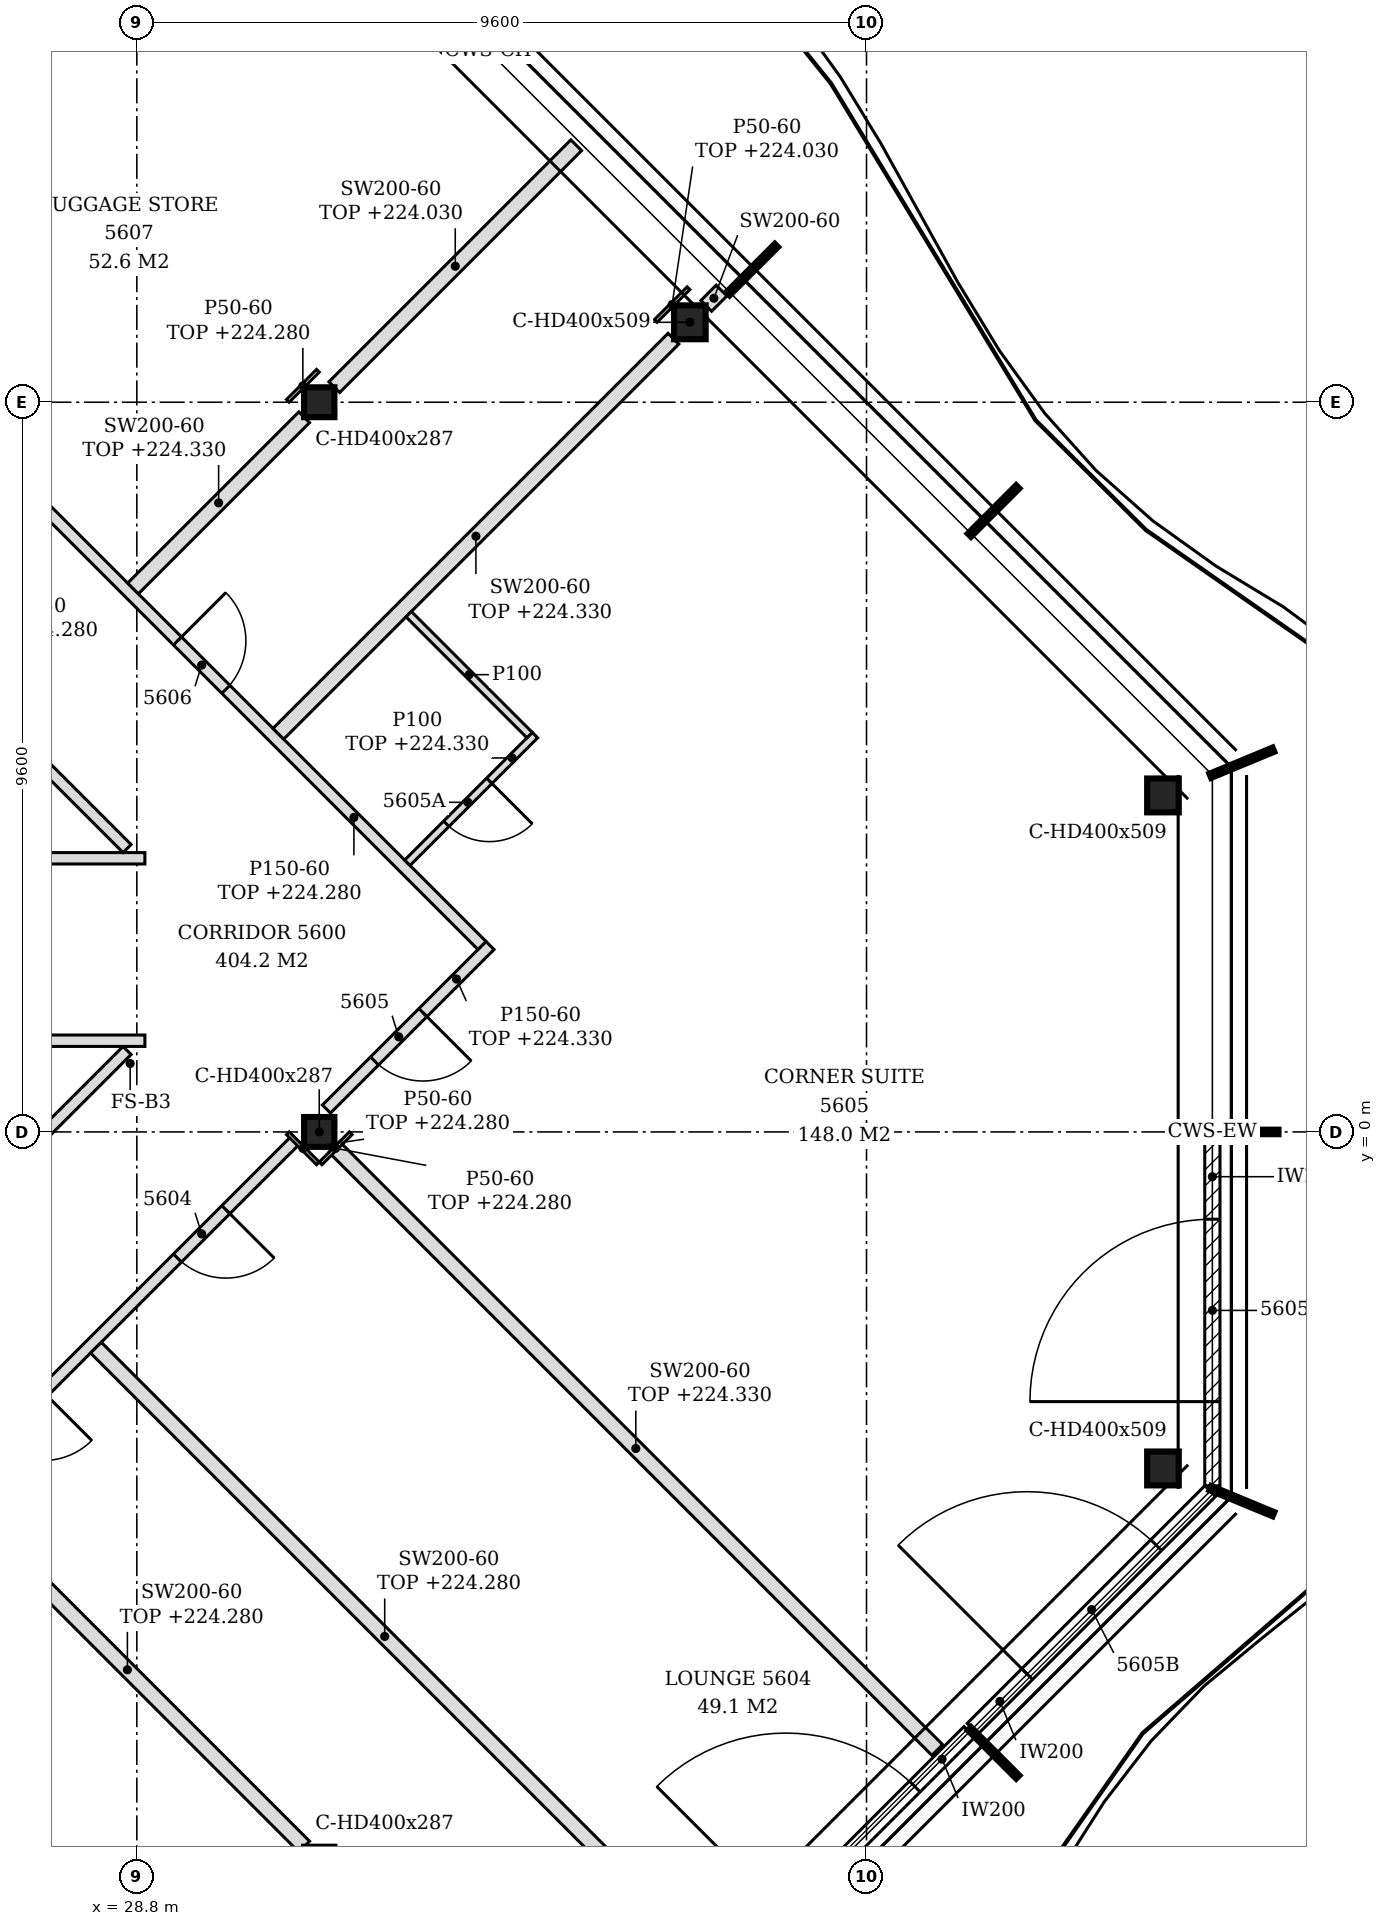
"""IFC4 building model, lengths in metres.
Left out: names, types, materials, properties, quantities, classifications, styles, units other than length and angle.
Written with IfcOpenShell. Run it as: python <this file> out.ifc"""

import sys

from ifc_helpers import new_model, si_unit, direction, frame, frame_2d, origin, origin_2d, place, context, subcontext, project, spatial, polyline, rectangle, i_section, outline, extrude, element, fill, save


model = new_model("IFC4")
c1 = context("Model", 3, precision=1e-05, world=origin(), true_north=direction((0.0, 1.0)))
c2 = subcontext(c1, "Body", "Model", "MODEL_VIEW")
j1 = project(units=[si_unit("LENGTHUNIT", "METRE"), si_unit("PLANEANGLEUNIT", "RADIAN")], contexts=[c1])
p1 = place(None, origin())
s1 = spatial("IfcSite", under=j1, at=p1, CompositionType="ELEMENT")
p2 = place(p1, origin())
s2 = spatial("IfcBuilding", under=s1, at=p2, CompositionType="ELEMENT")
p3 = place(p2, frame((0.0, 0.0, 221.4)))
s3 = spatial("IfcBuildingStorey", under=s2, at=p3, CompositionType="ELEMENT", Elevation=221.4)
for number, where, z_axis, x_axis in (
    (1, (42.3, -4.427, -0.15), (0.0, 0.0, 1.0), (1.0, 0.0, 0.0)),
    (2, (42.3, 4.427, -0.15), (0.0, 0.0, 1.0), (1.0, 0.0, 0.0)),
    (3, (36.076, 10.652, -0.15), (0.0, 0.0, 1.0), (1.0, 0.0, 0.0)),
):
    element("IfcColumn", number, at=place(p3, frame(where, z_axis=z_axis, x_axis=x_axis)), inside=s3, PredefinedType="COLUMN", context=c2, shape_type="SweptSolid", body=[
        extrude(i_section(OverallWidth=0.416, OverallDepth=0.446, WebThickness=0.039, FlangeThickness=0.063, FilletRadius=0.015, at=origin_2d()), origin(), (0.0, 0.0, 1.0), 3.6),
    ])
for number, where, z_axis, x_axis in (
    (4, (31.2, 0.0, -0.15), (0.0, 0.0, 1.0), (1.0, 0.0, 0.0)),
    (5, (31.2, 9.6, -0.15), (0.0, 0.0, 1.0), (1.0, 0.0, 0.0)),
):
    element("IfcColumn", number, at=place(p3, frame(where, z_axis=z_axis, x_axis=x_axis)), inside=s3, PredefinedType="COLUMN", context=c2, shape_type="SweptSolid", body=[
        extrude(i_section(OverallWidth=0.399, OverallDepth=0.393, WebThickness=0.023, FlangeThickness=0.037, FilletRadius=0.015, at=origin_2d()), origin(), (0.0, 0.0, 1.0), 3.6),
    ])
p4 = place(p3, frame((36.62, -11.026, 0.0), z_axis=(0.0, 0.0, 1.0), x_axis=(0.707106781187, 0.707106781187, 0.0)))
e6 = element("IfcWall", 6, at=p4, inside=s3, PredefinedType="NOTDEFINED", context=c2, shape_type="SweptSolid", body=[
    extrude(rectangle(XDim=4.431, YDim=0.2, at=frame_2d((2.215, 0.0))), origin(), (0.0, 0.0, 1.0), 3.45),
])
p5 = place(p4, frame((1.015, 0.0, 0.0)))
e7 = element("IfcOpeningElement", 7, at=p5, cuts=e6, PredefinedType="OPENING", context=c2, shape_type="SweptSolid", body=[
    extrude(rectangle(XDim=2.4, YDim=2.4, at=frame_2d((1.2, 1.2))), frame((0.0, 0.11, 0.0), z_axis=(0.0, -1.0, 0.0), x_axis=(1.0, 0.0, 0.0)), (0.0, 0.0, 1.0), 0.22),
])
p6 = place(p3, frame((39.796, -7.851, 0.0), z_axis=(0.0, 0.0, 1.0), x_axis=(0.707079168996, 0.707134392299, 0.0)))
e8 = element("IfcWall", 8, at=p6, inside=s3, PredefinedType="NOTDEFINED", context=c2, shape_type="SweptSolid", body=[
    extrude(rectangle(XDim=4.421, YDim=0.2, at=frame_2d((2.21, 0.0))), origin(), (0.0, 0.0, 1.0), 3.45),
])
p7 = place(p6, frame((1.015, 0.0, 0.0)))
e9 = element("IfcOpeningElement", 9, at=p7, cuts=e8, PredefinedType="OPENING", context=c2, shape_type="SweptSolid", body=[
    extrude(rectangle(XDim=2.4, YDim=2.4, at=frame_2d((1.2, 1.2))), frame((0.0, 0.11, 0.0), z_axis=(0.0, -1.0, 0.0), x_axis=(1.0, 0.0, 0.0)), (0.0, 0.0, 1.0), 0.22),
])
p8 = place(p3, frame((42.95, -4.656, 0.0), z_axis=(0.0, 0.0, 1.0), x_axis=(0.0, 1.0, 0.0)))
e10 = element("IfcWall", 10, at=p8, inside=s3, PredefinedType="NOTDEFINED", context=c2, shape_type="SweptSolid", body=[
    extrude(rectangle(XDim=4.626, YDim=0.2, at=frame_2d((2.313, 0.0))), origin(), (0.0, 0.0, 1.0), 3.45),
])
p9 = place(p8, frame((1.108, 0.0, 0.0)))
e11 = element("IfcOpeningElement", 11, at=p9, cuts=e10, PredefinedType="OPENING", context=c2, shape_type="SweptSolid", body=[
    extrude(rectangle(XDim=2.4, YDim=2.4, at=frame_2d((1.2, 1.2))), frame((0.0, 0.11, 0.0), z_axis=(0.0, -1.0, 0.0), x_axis=(1.0, 0.0, 0.0)), (0.0, 0.0, 1.0), 0.22),
])
p10 = place(p3, frame((29.636, -16.66, 0.0), z_axis=(0.0, 0.0, 1.0), x_axis=(-0.707095420673, 0.707118141518, 0.0)))
e12 = element("IfcWall", 12, at=p10, inside=s3, PredefinedType="PARTITIONING", context=c2, shape_type="SweptSolid", body=[
    extrude(rectangle(XDim=10.745, YDim=0.2, at=frame_2d((5.373, 0.0))), origin(), (0.0, 0.0, 1.0), 2.88),
])
p11 = place(p3, frame((16.722, -14.272, 0.0), z_axis=(0.0, 0.0, 1.0), x_axis=(0.707106781187, 0.707106781187, 0.0)))
e13 = element("IfcWall", 13, at=p11, inside=s3, PredefinedType="PARTITIONING", context=c2, shape_type="SweptSolid", body=[
    extrude(rectangle(XDim=20.049, YDim=0.15, at=frame_2d((10.025, 0.0))), origin(), (0.0, 0.0, 1.0), 2.73),
])
p12 = place(p11, frame((4.892, 0.0, 0.0)))
e14 = element("IfcOpeningElement", 14, at=p12, cuts=e13, PredefinedType="OPENING", context=c2, shape_type="SweptSolid", body=[
    extrude(rectangle(XDim=0.9, YDim=2.1, at=frame_2d((0.45, 1.05))), frame((0.0, 0.085, 0.0), z_axis=(0.0, -1.0, 0.0), x_axis=(1.0, 0.0, 0.0)), (0.0, 0.0, 1.0), 0.17),
])
p13 = place(p11, frame((10.042, 0.0, 0.0)))
e15 = element("IfcOpeningElement", 15, at=p13, cuts=e13, PredefinedType="OPENING", context=c2, shape_type="SweptSolid", body=[
    extrude(rectangle(XDim=0.9, YDim=2.1, at=frame_2d((0.45, 1.05))), frame((0.0, 0.085, 0.0), z_axis=(0.0, -1.0, 0.0), x_axis=(1.0, 0.0, 0.0)), (0.0, 0.0, 1.0), 0.17),
])
p14 = place(p11, frame((14.443, 0.0, 0.0)))
e16 = element("IfcOpeningElement", 16, at=p14, cuts=e13, PredefinedType="OPENING", context=c2, shape_type="SweptSolid", body=[
    extrude(rectangle(XDim=0.9, YDim=2.1, at=frame_2d((0.45, 1.05))), frame((0.0, 0.085, 0.0), z_axis=(0.0, -1.0, 0.0), x_axis=(1.0, 0.0, 0.0)), (0.0, 0.0, 1.0), 0.17),
])
p15 = place(p11, frame((17.837, 0.0, 0.0)))
e17 = element("IfcOpeningElement", 17, at=p15, cuts=e13, PredefinedType="OPENING", context=c2, shape_type="SweptSolid", body=[
    extrude(rectangle(XDim=0.9, YDim=2.1, at=frame_2d((0.45, 1.05))), frame((0.0, 0.085, 0.0), z_axis=(0.0, -1.0, 0.0), x_axis=(1.0, 0.0, 0.0)), (0.0, 0.0, 1.0), 0.17),
])
p16 = place(p3, frame((35.86, -10.436, 0.0), z_axis=(0.0, 0.0, 1.0), x_axis=(-0.707106781187, 0.707106781187, 0.0)))
e18 = element("IfcWall", 18, at=p16, inside=s3, PredefinedType="PARTITIONING", context=c2, shape_type="SweptSolid", body=[
    extrude(rectangle(XDim=10.745, YDim=0.2, at=frame_2d((5.373, 0.0))), origin(), (0.0, 0.0, 1.0), 2.88),
])
p17 = place(p3, frame((31.002, -9.402, 0.0), z_axis=(0.0, 0.0, 1.0), x_axis=(-0.707088226093, 0.707125335793, 0.0)))
e19 = element("IfcWall", 19, at=p17, inside=s3, PredefinedType="PARTITIONING", context=c2, shape_type="SweptSolid", body=[
    extrude(rectangle(XDim=6.579, YDim=0.2, at=frame_2d((3.29, 0.0))), origin(), (0.0, 0.0, 1.0), 2.88),
])
p18 = place(p3, frame((19.398, -8.202, 0.0), z_axis=(0.0, 0.0, 1.0), x_axis=(0.707116088468, 0.707097473782, 0.0)))
e20 = element("IfcWall", 20, at=p18, inside=s3, PredefinedType="PARTITIONING", context=c2, shape_type="SweptSolid", body=[
    extrude(rectangle(XDim=13.115, YDim=0.15, at=frame_2d((6.558, 0.0))), origin(), (0.0, 0.0, 1.0), 2.88),
])
p19 = place(p18, frame((6.058, 0.0, 0.0)))
e21 = element("IfcOpeningElement", 21, at=p19, cuts=e20, PredefinedType="OPENING", context=c2, shape_type="SweptSolid", body=[
    extrude(rectangle(XDim=0.9, YDim=2.1, at=frame_2d((0.45, 1.05))), frame((0.0, 0.085, 0.0), z_axis=(0.0, -1.0, 0.0), x_axis=(1.0, 0.0, 0.0)), (0.0, 0.0, 1.0), 0.17),
])
p20 = place(p3, frame((39.331, -8.131, 0.0), z_axis=(0.0, 0.0, 1.0), x_axis=(-0.707106781187, 0.707106781187, 0.0)))
e22 = element("IfcWall", 22, at=p20, inside=s3, PredefinedType="PARTITIONING", context=c2, shape_type="SweptSolid", body=[
    extrude(rectangle(XDim=11.219, YDim=0.2, at=frame_2d((5.61, 0.0))), origin(), (0.0, 0.0, 1.0), 2.93),
])
p21 = place(p3, frame((31.295, 0.301, 0.0), z_axis=(0.0, 0.0, 1.0), x_axis=(0.707146890479, 0.707066669618, 0.0)))
e23 = element("IfcWall", 23, at=p21, inside=s3, PredefinedType="PARTITIONING", context=c2, shape_type="SweptSolid", body=[
    extrude(rectangle(XDim=3.043, YDim=0.15, at=frame_2d((1.522, 0.0))), origin(), (0.0, 0.0, 1.0), 2.93),
])
p22 = place(p21, frame((0.895, 0.0, 0.0)))
e24 = element("IfcOpeningElement", 24, at=p22, cuts=e23, PredefinedType="OPENING", context=c2, shape_type="SweptSolid", body=[
    extrude(rectangle(XDim=0.9, YDim=2.1, at=frame_2d((0.45, 1.05))), frame((0.0, 0.085, 0.0), z_axis=(0.0, -1.0, 0.0), x_axis=(1.0, 0.0, 0.0)), (0.0, 0.0, 1.0), 0.17),
])
p23 = place(p3, frame((19.125, 1.2, 0.0), z_axis=(0.0, 0.0, 1.0), x_axis=(1.0, 0.0, 0.0)))
e25 = element("IfcWall", 25, at=p23, inside=s3, PredefinedType="PARTITIONING", context=c2, shape_type="SweptSolid", body=[
    extrude(outline(polyline([(0.0, 0.0), (9.781, 0.0), (9.781, 3.45), (0.225, 3.45), (0.223, 2.83), (0.0, 2.83), (0.0, 0.0)])), frame((0.0, 0.075, 0.0), z_axis=(0.0, -1.0, 0.0), x_axis=(1.0, 0.0, 0.0)), (0.0, 0.0, 1.0), 0.15),
])
p24 = place(p3, frame((33.341, 2.453, 0.0), z_axis=(0.0, 0.0, 1.0), x_axis=(-0.707098652635, 0.707114909645, 0.0)))
e26 = element("IfcWall", 26, at=p24, inside=s3, PredefinedType="PARTITIONING", context=c2, shape_type="SweptSolid", body=[
    extrude(rectangle(XDim=15.018, YDim=0.15, at=frame_2d((7.509, 0.0))), origin(), (0.0, 0.0, 1.0), 2.88),
])
p25 = place(p24, frame((4.766, 0.0, 0.0)))
e27 = element("IfcOpeningElement", 27, at=p25, cuts=e26, PredefinedType="OPENING", context=c2, shape_type="SweptSolid", body=[
    extrude(rectangle(XDim=0.9, YDim=2.1, at=frame_2d((0.45, 1.05))), frame((0.0, 0.085, 0.0), z_axis=(0.0, -1.0, 0.0), x_axis=(1.0, 0.0, 0.0)), (0.0, 0.0, 1.0), 0.17),
])
p26 = place(p24, frame((9.167, 0.0, 0.0)))
e28 = element("IfcOpeningElement", 28, at=p26, cuts=e26, PredefinedType="OPENING", context=c2, shape_type="SweptSolid", body=[
    extrude(rectangle(XDim=0.9, YDim=2.1, at=frame_2d((0.45, 1.05))), frame((0.0, 0.085, 0.0), z_axis=(0.0, -1.0, 0.0), x_axis=(1.0, 0.0, 0.0)), (0.0, 0.0, 1.0), 0.17),
])
p27 = place(p24, frame((13.482, 0.0, 0.0)))
e29 = element("IfcOpeningElement", 29, at=p27, cuts=e26, PredefinedType="OPENING", context=c2, shape_type="SweptSolid", body=[
    extrude(rectangle(XDim=0.9, YDim=2.1, at=frame_2d((0.45, 1.05))), frame((0.0, 0.085, 0.0), z_axis=(0.0, -1.0, 0.0), x_axis=(1.0, 0.0, 0.0)), (0.0, 0.0, 1.0), 0.17),
])
p28 = place(p3, frame((32.359, 3.541, 0.0), z_axis=(0.0, 0.0, 1.0), x_axis=(0.707158179099, 0.707055379538, 0.0)))
e30 = element("IfcWall", 30, at=p28, inside=s3, PredefinedType="PARTITIONING", context=c2, shape_type="SweptSolid", body=[
    extrude(rectangle(XDim=2.375, YDim=0.1, at=frame_2d((1.188, 0.0))), origin(), (0.0, 0.0, 1.0), 2.93),
])
p29 = place(p28, frame((0.725, 0.0, 0.0)))
e31 = element("IfcOpeningElement", 31, at=p29, cuts=e30, PredefinedType="OPENING", context=c2, shape_type="SweptSolid", body=[
    extrude(rectangle(XDim=0.8, YDim=2.1, at=frame_2d((0.4, 1.05))), frame((0.0, 0.06, 0.0), z_axis=(0.0, -1.0, 0.0), x_axis=(1.0, 0.0, 0.0)), (0.0, 0.0, 1.0), 0.12),
])
p30 = place(p3, frame((19.125, 3.6, 0.0), z_axis=(0.0, 0.0, 1.0), x_axis=(1.0, 0.0, 0.0)))
e32 = element("IfcWall", 32, at=p30, inside=s3, PredefinedType="PARTITIONING", context=c2, shape_type="SweptSolid", body=[
    extrude(outline(polyline([(0.0, 0.0), (9.781, 0.0), (9.781, 3.45), (0.225, 3.45), (0.223, 2.83), (0.0, 2.83), (0.0, 0.0)])), frame((0.0, 0.075, 0.0), z_axis=(0.0, -1.0, 0.0), x_axis=(1.0, 0.0, 0.0)), (0.0, 0.0, 1.0), 0.15),
])
p31 = place(p30, frame((1.175, 0.0, 0.0)))
e33 = element("IfcOpeningElement", 33, at=p31, cuts=e32, PredefinedType="OPENING", context=c2, shape_type="SweptSolid", body=[
    extrude(rectangle(XDim=0.8, YDim=2.1, at=frame_2d((0.4, 1.05))), frame((0.0, 0.085, 0.0), z_axis=(0.0, -1.0, 0.0), x_axis=(1.0, 0.0, 0.0)), (0.0, 0.0, 1.0), 0.17),
])
p32 = place(p3, frame((28.672, 3.728, 0.0), z_axis=(0.0, 0.0, 1.0), x_axis=(-0.707116088468, 0.707097473782, 0.0)))
e34 = element("IfcWall", 34, at=p32, inside=s3, PredefinedType="PARTITIONING", context=c2, shape_type="SweptSolid", body=[
    extrude(rectangle(XDim=13.115, YDim=0.15, at=frame_2d((6.558, 0.0))), origin(), (0.0, 0.0, 1.0), 2.88),
])
p33 = place(p32, frame((6.157, 0.0, 0.0)))
e35 = element("IfcOpeningElement", 35, at=p33, cuts=e34, PredefinedType="OPENING", context=c2, shape_type="SweptSolid", body=[
    extrude(rectangle(XDim=0.9, YDim=2.1, at=frame_2d((0.45, 1.05))), frame((0.0, 0.085, 0.0), z_axis=(0.0, -1.0, 0.0), x_axis=(1.0, 0.0, 0.0)), (0.0, 0.0, 1.0), 0.17),
])
p34 = place(p3, frame((30.662, 5.238, 0.0), z_axis=(0.0, 0.0, 1.0), x_axis=(0.707106781187, 0.707106781187, 0.0)))
e36 = element("IfcWall", 36, at=p34, inside=s3, PredefinedType="PARTITIONING", context=c2, shape_type="SweptSolid", body=[
    extrude(rectangle(XDim=7.351, YDim=0.2, at=frame_2d((3.676, 0.0))), origin(), (0.0, 0.0, 1.0), 2.93),
])
p35 = place(p3, frame((33.968, 5.22, 0.0), z_axis=(0.0, 0.0, 1.0), x_axis=(-0.707106781187, 0.707106781187, 0.0)))
e37 = element("IfcWall", 37, at=p35, inside=s3, PredefinedType="PARTITIONING", context=c2, shape_type="SweptSolid", body=[
    extrude(rectangle(XDim=2.25, YDim=0.1, at=frame_2d((1.125, 0.0))), origin(), (0.0, 0.0, 1.0), 3.45),
])
p36 = place(p3, frame((28.75, 7.15, 0.0), z_axis=(0.0, 0.0, 1.0), x_axis=(0.7070684525, 0.707145107796, 0.0)))
e38 = element("IfcWall", 38, at=p36, inside=s3, PredefinedType="PARTITIONING", context=c2, shape_type="SweptSolid", body=[
    extrude(rectangle(XDim=3.185, YDim=0.2, at=frame_2d((1.592, 0.0))), origin(), (0.0, 0.0, 1.0), 2.93),
])
p37 = place(p3, frame((31.398, 9.798, 0.0), z_axis=(0.0, 0.0, 1.0), x_axis=(0.707133900936, 0.707079660397, 0.0)))
e39 = element("IfcWall", 39, at=p37, inside=s3, PredefinedType="PARTITIONING", context=c2, shape_type="SweptSolid", body=[
    extrude(rectangle(XDim=4.501, YDim=0.2, at=frame_2d((2.25, 0.0))), origin(), (0.0, 0.0, 1.0), 2.63),
])
p38 = place(p3, frame((36.291, 10.867, 0.0), z_axis=(0.0, 0.0, 1.0), x_axis=(0.707534423513, 0.706678880075, 0.0)))
e40 = element("IfcWall", 40, at=p38, inside=s3, PredefinedType="PARTITIONING", context=c2, shape_type="SweptSolid", body=[
    extrude(rectangle(XDim=0.285, YDim=0.2, at=frame_2d((0.143, 0.0))), origin(), (0.0, 0.0, 1.0), 3.45),
])
p39 = place(p3, frame((24.438, 11.462, 0.0), z_axis=(0.0, 0.0, 1.0), x_axis=(0.707090175614, 0.707123386369, 0.0)))
e41 = element("IfcWall", 41, at=p39, inside=s3, PredefinedType="PARTITIONING", context=c2, shape_type="SweptSolid", body=[
    extrude(rectangle(XDim=7.351, YDim=0.2, at=frame_2d((3.676, 0.0))), origin(), (0.0, 0.0, 1.0), 2.88),
])
for number, where, z_axis, x_axis in (
    (42, (31.218, -0.414, 0.0), (0.0, 0.0, 1.0), (0.707, 0.707, 0.0)),
    (43, (31.182, -0.414, 0.0), (0.0, 0.0, 1.0), (-0.707, 0.707, 0.0)),
):
    element("IfcWall", number, at=place(p3, frame(where, z_axis=z_axis, x_axis=x_axis)), inside=s3, PredefinedType="PARTITIONING", context=c2, shape_type="SweptSolid", body=[
        extrude(rectangle(XDim=0.56, YDim=0.05, at=frame_2d((0.28, 0.0))), origin(), (0.0, 0.0, 1.0), 2.88),
    ])
p40 = place(p3, frame((35.627, 10.669, 0.0), z_axis=(0.0, 0.0, 1.0), x_axis=(0.707307009627, 0.706906496032, 0.0)))
e44 = element("IfcWall", 44, at=p40, inside=s3, PredefinedType="PARTITIONING", context=c2, shape_type="SweptSolid", body=[
    extrude(rectangle(XDim=0.61, YDim=0.05, at=frame_2d((0.305, 0.0))), origin(), (0.0, 0.0, 1.0), 2.63),
])
p41 = place(p3, frame((30.786, 9.618, 0.0), z_axis=(0.0, 0.0, 1.0), x_axis=(0.707106781187, 0.707106781187, 0.0)))
e45 = element("IfcWall", 45, at=p41, inside=s3, PredefinedType="PARTITIONING", context=c2, shape_type="SweptSolid", body=[
    extrude(rectangle(XDim=0.56, YDim=0.05, at=frame_2d((0.28, 0.0))), origin(), (0.0, 0.0, 1.0), 2.88),
])
p42 = place(p5, origin())
e46 = element("IfcDoor", 46, at=p42, inside=s3, OperationType="SINGLE_SWING_LEFT", PredefinedType="DOOR", context=c2, shape_type="SweptSolid", body=[
    extrude(rectangle(XDim=2.4, YDim=2.4, at=frame_2d((1.2, 1.2))), frame((0.0, 0.025, 0.0), z_axis=(0.0, -1.0, 0.0), x_axis=(1.0, 0.0, 0.0)), (0.0, 0.0, 1.0), 0.05),
])
fill(e7, e46)
p43 = place(p7, origin())
e47 = element("IfcDoor", 47, at=p43, inside=s3, OperationType="SINGLE_SWING_LEFT", PredefinedType="DOOR", context=c2, shape_type="SweptSolid", body=[
    extrude(rectangle(XDim=2.4, YDim=2.4, at=frame_2d((1.2, 1.2))), frame((0.0, 0.025, 0.0), z_axis=(0.0, -1.0, 0.0), x_axis=(1.0, 0.0, 0.0)), (0.0, 0.0, 1.0), 0.05),
])
fill(e9, e47)
p44 = place(p9, origin())
e48 = element("IfcDoor", 48, at=p44, inside=s3, OperationType="SINGLE_SWING_LEFT", PredefinedType="DOOR", context=c2, shape_type="SweptSolid", body=[
    extrude(rectangle(XDim=2.4, YDim=2.4, at=frame_2d((1.2, 1.2))), frame((0.0, 0.025, 0.0), z_axis=(0.0, -1.0, 0.0), x_axis=(1.0, 0.0, 0.0)), (0.0, 0.0, 1.0), 0.05),
])
fill(e11, e48)
p45 = place(p15, frame((0.9, 0.0, 0.0), z_axis=(0.0, 0.0, 1.0), x_axis=(-1.0, 0.0, 0.0)))
e49 = element("IfcDoor", 49, at=p45, inside=s3, OperationType="SINGLE_SWING_LEFT", PredefinedType="DOOR", context=c2, shape_type="SweptSolid", body=[
    extrude(rectangle(XDim=0.9, YDim=2.1, at=frame_2d((0.45, 1.05))), frame((0.0, 0.025, 0.0), z_axis=(0.0, -1.0, 0.0), x_axis=(1.0, 0.0, 0.0)), (0.0, 0.0, 1.0), 0.05),
])
fill(e17, e49)
p46 = place(p22, frame((0.9, 0.0, 0.0), z_axis=(0.0, 0.0, 1.0), x_axis=(-1.0, 0.0, 0.0)))
e50 = element("IfcDoor", 50, at=p46, inside=s3, OperationType="SINGLE_SWING_LEFT", PredefinedType="DOOR", context=c2, shape_type="SweptSolid", body=[
    extrude(rectangle(XDim=0.9, YDim=2.1, at=frame_2d((0.45, 1.05))), frame((0.0, 0.025, 0.0), z_axis=(0.0, -1.0, 0.0), x_axis=(1.0, 0.0, 0.0)), (0.0, 0.0, 1.0), 0.05),
])
fill(e24, e50)
p47 = place(p29, frame((0.8, 0.0, 0.0), z_axis=(0.0, 0.0, 1.0), x_axis=(-1.0, 0.0, 0.0)))
e51 = element("IfcDoor", 51, at=p47, inside=s3, OperationType="SINGLE_SWING_LEFT", PredefinedType="DOOR", context=c2, shape_type="SweptSolid", body=[
    extrude(rectangle(XDim=0.8, YDim=2.1, at=frame_2d((0.4, 1.05))), frame((0.0, 0.025, 0.0), z_axis=(0.0, -1.0, 0.0), x_axis=(1.0, 0.0, 0.0)), (0.0, 0.0, 1.0), 0.05),
])
fill(e31, e51)
p48 = place(p25, frame((0.9, 0.0, 0.0), z_axis=(0.0, 0.0, 1.0), x_axis=(-1.0, 0.0, 0.0)))
e52 = element("IfcDoor", 52, at=p48, inside=s3, OperationType="SINGLE_SWING_LEFT", PredefinedType="DOOR", context=c2, shape_type="SweptSolid", body=[
    extrude(rectangle(XDim=0.9, YDim=2.1, at=frame_2d((0.45, 1.05))), frame((0.0, 0.025, 0.0), z_axis=(0.0, -1.0, 0.0), x_axis=(1.0, 0.0, 0.0)), (0.0, 0.0, 1.0), 0.05),
])
fill(e27, e52)
save(model, sys.argv[1])
